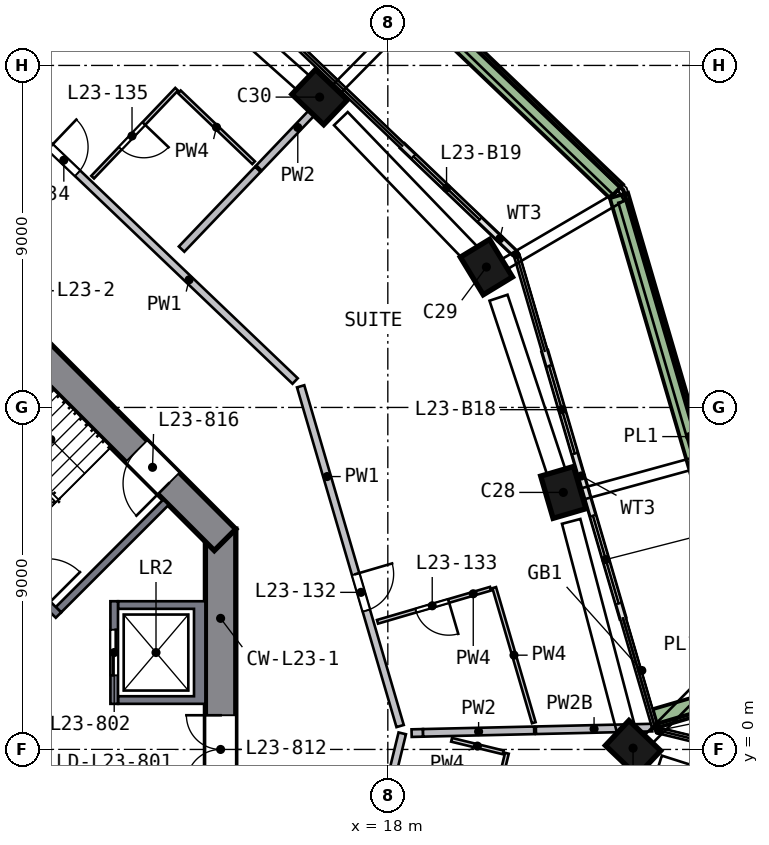
"""IFC4 building model, lengths in metres.
Left out: names, types, materials, properties, quantities, classifications, styles, units other than length and angle.
Written with IfcOpenShell. Run it as: python <this file> out.ifc"""

import sys

from ifc_helpers import new_model, si_unit, direction, frame, frame_2d, origin, origin_2d, place, context, subcontext, project, spatial, polyline, rectangle, outline, extrude, element, fill, save


model = new_model("IFC4")
c1 = context("Model", 3, precision=1e-05, world=origin(), true_north=direction((0.0, 1.0)))
c2 = subcontext(c1, "Body", "Model", "MODEL_VIEW")
j1 = project(units=[si_unit("LENGTHUNIT", "METRE"), si_unit("PLANEANGLEUNIT", "RADIAN")], contexts=[c1])
p1 = place(None, origin())
s1 = spatial("IfcSite", under=j1, at=p1, CompositionType="ELEMENT")
p2 = place(p1, origin())
s2 = spatial("IfcBuilding", under=s1, at=p2, CompositionType="ELEMENT")
p3 = place(p2, frame((0.0, 0.0, 100.0)))
s3 = spatial("IfcBuildingStorey", under=s2, at=p3, CompositionType="ELEMENT", Elevation=100.0)
p4 = place(p3, frame((24.454, -0.106, 0.0), z_axis=(-0.000532111, 0.116228153, 0.993222399), x_axis=(0.725905426, -0.683088025, 0.08032473)))
e1 = element("IfcColumn", 1, at=p4, inside=s3, PredefinedType="COLUMN", context=c2, shape_type="SweptSolid", body=[
    extrude(rectangle(XDim=1.15, YDim=0.9, at=origin_2d()), origin(), (0.0, 0.0, 1.0), 3.212),
])
p5 = place(p3, frame((22.657, 6.634, 0.0), z_axis=(-0.032397695, 0.10745996, 0.993681411), x_axis=(-0.278746305, 0.953784116, -0.112233498)))
e2 = element("IfcColumn", 2, at=p5, inside=s3, PredefinedType="COLUMN", context=c2, shape_type="SweptSolid", body=[
    extrude(rectangle(XDim=1.15, YDim=0.9, at=origin_2d()), origin(), (0.0, 0.0, 1.0), 3.21),
])
p6 = place(p3, frame((20.667, 12.576, 0.0), z_axis=(-0.060592698, 0.097845423, 0.993355323), x_axis=(0.515804242, -0.848941532, 0.115083708)))
e3 = element("IfcColumn", 3, at=p6, inside=s3, PredefinedType="COLUMN", context=c2, shape_type="SweptSolid", body=[
    extrude(rectangle(XDim=1.15, YDim=0.9, at=origin_2d()), origin(), (0.0, 0.0, 1.0), 3.211),
])
p7 = place(p3, frame((16.305, 17.074, 0.0), z_axis=(-0.0819059, 0.076886597, 0.993669902), x_axis=(-0.718682033, 0.686204712, -0.112335337)))
e4 = element("IfcColumn", 4, at=p7, inside=s3, PredefinedType="COLUMN", context=c2, shape_type="SweptSolid", body=[
    extrude(rectangle(XDim=1.15, YDim=0.9, at=origin_2d()), origin(), (0.0, 0.0, 1.0), 3.21),
])
p8 = place(p3, frame((13.6, -5.799, 0.0), z_axis=(0.0, 0.0, 1.0), x_axis=(0.0, 1.0, 0.0)))
e5 = element("IfcWall", 5, at=p8, inside=s3, PredefinedType="SHEAR", context=c2, shape_type="SweptSolid", body=[
    extrude(rectangle(XDim=11.598, YDim=0.8, at=frame_2d((5.799, 0.0))), origin(), (0.0, 0.0, 1.0), 3.5),
])
p9 = place(p8, frame((4.899, 0.0, 0.0)))
e6 = element("IfcOpeningElement", 6, at=p9, cuts=e5, PredefinedType="OPENING", context=c2, shape_type="SweptSolid", body=[
    extrude(rectangle(XDim=1.8, YDim=2.1, at=frame_2d((0.9, 1.05))), frame((0.0, 0.41, 0.0), z_axis=(0.0, -1.0, 0.0), x_axis=(1.0, 0.0, 0.0)), (0.0, 0.0, 1.0), 0.82),
])
p10 = place(p3, frame((13.717, 5.516, 0.0), z_axis=(0.0, 0.0, 1.0), x_axis=(-0.707106781, 0.707106781, 0.0)))
e7 = element("IfcWall", 7, at=p10, inside=s3, PredefinedType="SHEAR", context=c2, shape_type="SweptSolid", body=[
    extrude(rectangle(XDim=11.598, YDim=0.8, at=frame_2d((5.799, 0.0))), origin(), (0.0, 0.0, 1.0), 3.5),
])
p11 = place(p10, frame((2.099, 0.0, 0.0)))
e8 = element("IfcOpeningElement", 8, at=p11, cuts=e7, PredefinedType="OPENING", context=c2, shape_type="SweptSolid", body=[
    extrude(rectangle(XDim=1.2, YDim=2.1, at=frame_2d((0.6, 1.05))), frame((0.0, 0.41, 0.0), z_axis=(0.0, -1.0, 0.0), x_axis=(1.0, 0.0, 0.0)), (0.0, 0.0, 1.0), 0.82),
])
p12 = place(p3, frame((24.185, 3.461, 0.0), z_axis=(0.0, 0.0, 1.0), x_axis=(-0.28096031, 0.959719388, 0.0)))
e9 = element("IfcWall", 9, at=p12, inside=s3, PredefinedType="SOLIDWALL", context=c2, shape_type="SweptSolid", body=[
    extrude(rectangle(XDim=3.475, YDim=0.15, at=frame_2d((1.737, 0.0))), origin(), (0.0, 0.0, 1.0), 2.425),
])
p13 = place(p12, frame((0.4, 0.0, 0.0)))
e10 = element("IfcOpeningElement", 10, at=p13, cuts=e9, PredefinedType="OPENING", context=c2, shape_type="SweptSolid", body=[
    extrude(rectangle(XDim=2.4, YDim=2.4, at=frame_2d((1.2, 1.2))), frame((0.0, 0.085, 0.0), z_axis=(0.0, -1.0, 0.0), x_axis=(1.0, 0.0, 0.0)), (0.0, 0.0, 1.0), 0.17),
])
p14 = place(p3, frame((23.209, 6.796, 0.0), z_axis=(0.0, 0.0, 1.0), x_axis=(-0.281028882, 0.959699311, 0.0)))
e11 = element("IfcWall", 11, at=p14, inside=s3, PredefinedType="SOLIDWALL", context=c2, shape_type="SweptSolid", body=[
    extrude(rectangle(XDim=3.835, YDim=0.15, at=frame_2d((1.918, 0.0))), origin(), (0.0, 0.0, 1.0), 2.425),
])
p15 = place(p14, frame((1.035, 0.0, 0.0)))
e12 = element("IfcOpeningElement", 12, at=p15, cuts=e11, PredefinedType="OPENING", context=c2, shape_type="SweptSolid", body=[
    extrude(rectangle(XDim=2.4, YDim=2.4, at=frame_2d((1.2, 1.2))), frame((0.0, 0.085, 0.0), z_axis=(0.0, -1.0, 0.0), x_axis=(1.0, 0.0, 0.0)), (0.0, 0.0, 1.0), 0.17),
])
p16 = place(p3, frame((21.33, 13.07, 0.0), z_axis=(0.0, 0.0, 1.0), x_axis=(-0.723183846, 0.690655576, 0.0)))
e13 = element("IfcWall", 13, at=p16, inside=s3, PredefinedType="SOLIDWALL", context=c2, shape_type="SweptSolid", body=[
    extrude(rectangle(XDim=4.068, YDim=0.15, at=frame_2d((2.034, 0.0))), origin(), (0.0, 0.0, 1.0), 2.425),
])
p17 = place(p16, frame((1.268, 0.0, 0.0)))
e14 = element("IfcOpeningElement", 14, at=p17, cuts=e13, PredefinedType="OPENING", context=c2, shape_type="SweptSolid", body=[
    extrude(rectangle(XDim=2.4, YDim=2.4, at=frame_2d((1.2, 1.2))), frame((0.0, 0.085, 0.0), z_axis=(0.0, -1.0, 0.0), x_axis=(1.0, 0.0, 0.0)), (0.0, 0.0, 1.0), 0.17),
])
p18 = place(p3, frame((25.038, 0.819, 0.0), z_axis=(0.0, 0.0, 1.0), x_axis=(0.959706288, 0.281005054, 0.0)))
e15 = element("IfcWall", 15, at=p18, inside=s3, PredefinedType="SOLIDWALL", context=c2, shape_type="SweptSolid", body=[
    extrude(rectangle(XDim=3.199, YDim=0.5, at=frame_2d((1.6, 0.0))), origin(), (0.0, 0.0, 1.0), 0.7),
])
p19 = place(p3, frame((27.798, 1.887, 0.0), z_axis=(0.0, 0.0, 1.0), x_axis=(-0.281006596, 0.959705837, 0.0)))
e16 = element("IfcWall", 16, at=p19, inside=s3, PredefinedType="SOLIDWALL", context=c2, shape_type="SweptSolid", body=[
    extrude(rectangle(XDim=13.223, YDim=0.5, at=frame_2d((6.612, 0.0))), origin(), (0.0, 0.0, 1.0), 0.7),
])
p20 = place(p3, frame((24.015, 14.688, 0.0), z_axis=(0.0, 0.0, 1.0), x_axis=(-0.723197204, 0.690641589, 0.0)))
e17 = element("IfcWall", 17, at=p20, inside=s3, PredefinedType="SOLIDWALL", context=c2, shape_type="SweptSolid", body=[
    extrude(rectangle(XDim=13.724, YDim=0.5, at=frame_2d((6.862, 0.0))), origin(), (0.0, 0.0, 1.0), 0.7),
])
p21 = place(p3, frame((27.412, -0.137, 0.0), z_axis=(0.0, 0.0, 1.0), x_axis=(-0.236506093, -0.971630006, 0.0)))
e18 = element("IfcWall", 18, at=p21, inside=s3, PredefinedType="SOLIDWALL", context=c2, shape_type="SweptSolid", body=[
    extrude(rectangle(XDim=12.7, YDim=0.2, at=frame_2d((6.35, 0.0))), origin(), (0.0, 0.0, 1.0), 3.19),
])
p22 = place(p21, frame((5.45, 0.0, 0.0)))
e19 = element("IfcOpeningElement", 19, at=p22, cuts=e18, PredefinedType="OPENING", context=c2, shape_type="SweptSolid", body=[
    extrude(rectangle(XDim=1.8, YDim=2.4, at=frame_2d((0.9, 1.2))), frame((0.0, 0.11, 0.0), z_axis=(0.0, -1.0, 0.0), x_axis=(1.0, 0.0, 0.0)), (0.0, 0.0, 1.0), 0.22),
])
p23 = place(p3, origin())
e20 = element("IfcWall", 20, at=p23, inside=s3, PredefinedType="SOLIDWALL", context=c2, shape_type="SweptSolid", body=[
    extrude(outline(polyline([(13.2, 3.9), (13.2, 1.2), (10.9, 1.2), (10.9, 1.4), (12.9, 1.4), (12.9, 3.7), (10.9, 3.7), (10.9, 3.9), (13.2, 3.9)])), origin(), (0.0, 0.0, 1.0), 3.19),
])
p24 = place(p3, frame((10.8, 1.2, 0.0), z_axis=(0.0, 0.0, 1.0), x_axis=(0.0, 1.0, 0.0)))
e21 = element("IfcWall", 21, at=p24, inside=s3, PredefinedType="SOLIDWALL", context=c2, shape_type="SweptSolid", body=[
    extrude(rectangle(XDim=2.7, YDim=0.2, at=frame_2d((1.35, 0.0))), origin(), (0.0, 0.0, 1.0), 3.19),
])
p25 = place(p24, frame((0.75, 0.0, 0.0)))
e22 = element("IfcOpeningElement", 22, at=p25, cuts=e21, PredefinedType="OPENING", context=c2, shape_type="SweptSolid", body=[
    extrude(rectangle(XDim=1.2, YDim=2.1, at=frame_2d((0.6, 1.05))), frame((0.0, 0.11, 0.0), z_axis=(0.0, -1.0, 0.0), x_axis=(1.0, 0.0, 0.0)), (0.0, 0.0, 1.0), 0.22),
])
p26 = place(p3, frame((3.535, 9.334, 0.0), z_axis=(0.0, 0.0, 1.0), x_axis=(0.707106781, -0.707106781, 0.0)))
e23 = element("IfcWall", 23, at=p26, inside=s3, PredefinedType="SOLIDWALL", context=c2, shape_type="SweptSolid", body=[
    extrude(rectangle(XDim=8.2, YDim=0.2, at=frame_2d((4.1, 0.0))), origin(), (0.0, 0.0, 1.0), 3.19),
])
p27 = place(p26, frame((6.6, 0.0, 0.0)))
e24 = element("IfcOpeningElement", 24, at=p27, cuts=e23, PredefinedType="OPENING", context=c2, shape_type="SweptSolid", body=[
    extrude(rectangle(XDim=1.2, YDim=2.1, at=frame_2d((0.6, 1.05))), frame((0.0, 0.11, 0.0), z_axis=(0.0, -1.0, 0.0), x_axis=(1.0, 0.0, 0.0)), (0.0, 0.0, 1.0), 0.22),
])
p28 = place(p3, frame((9.334, 3.677, 0.0), z_axis=(0.0, 0.0, 1.0), x_axis=(0.707106781, 0.707106781, 0.0)))
e25 = element("IfcWall", 25, at=p28, inside=s3, PredefinedType="SOLIDWALL", context=c2, shape_type="SweptSolid", body=[
    extrude(rectangle(XDim=4.0, YDim=0.2, at=frame_2d((2.0, 0.0))), origin(), (0.0, 0.0, 1.0), 3.19),
])
p29 = place(p3, frame((8.968, 15.991, 0.0), z_axis=(0.0, 0.0, 1.0), x_axis=(0.723216288, -0.690621605, 0.0)))
e26 = element("IfcWall", 26, at=p29, inside=s3, PredefinedType="SOLIDWALL", context=c2, shape_type="SweptSolid", body=[
    extrude(rectangle(XDim=9.115, YDim=0.2, at=frame_2d((4.558, 0.0))), origin(), (0.0, 0.0, 1.0), 3.19),
])
p30 = place(p29, frame((0.2, 0.0, 0.0)))
e27 = element("IfcOpeningElement", 27, at=p30, cuts=e26, PredefinedType="OPENING", context=c2, shape_type="SweptSolid", body=[
    extrude(rectangle(XDim=1.0, YDim=2.1, at=frame_2d((0.5, 1.05))), frame((0.0, 0.11, 0.0), z_axis=(0.0, -1.0, 0.0), x_axis=(1.0, 0.0, 0.0)), (0.0, 0.0, 1.0), 0.22),
])
p31 = place(p3, frame((15.706, 9.556, 0.0), z_axis=(0.0, 0.0, 1.0), x_axis=(0.281011202, -0.959704488, 0.0)))
e28 = element("IfcWall", 28, at=p31, inside=s3, PredefinedType="SOLIDWALL", context=c2, shape_type="SweptSolid", body=[
    extrude(rectangle(XDim=9.316, YDim=0.2, at=frame_2d((4.658, 0.0))), origin(), (0.0, 0.0, 1.0), 3.19),
])
p32 = place(p31, frame((5.15, 0.0, 0.0)))
e29 = element("IfcOpeningElement", 29, at=p32, cuts=e28, PredefinedType="OPENING", context=c2, shape_type="SweptSolid", body=[
    extrude(rectangle(XDim=1.0, YDim=2.1, at=frame_2d((0.5, 1.05))), frame((0.0, 0.11, 0.0), z_axis=(0.0, -1.0, 0.0), x_axis=(1.0, 0.0, 0.0)), (0.0, 0.0, 1.0), 0.22),
])
p33 = place(p3, frame((17.515, -3.131, 0.0), z_axis=(0.0, 0.0, 1.0), x_axis=(0.236501426, 0.971631142, 0.0)))
e30 = element("IfcWall", 30, at=p33, inside=s3, PredefinedType="SOLIDWALL", context=c2, shape_type="SweptSolid", body=[
    extrude(rectangle(XDim=3.658, YDim=0.2, at=frame_2d((1.829, 0.0))), origin(), (0.0, 0.0, 1.0), 3.19),
])
p34 = place(p3, frame((12.573, 13.167, 0.0), z_axis=(0.0, 0.0, 1.0), x_axis=(0.690655642, 0.723183783, 0.0)))
e31 = element("IfcWall", 31, at=p34, inside=s3, PredefinedType="SOLIDWALL", context=c2, shape_type="SweptSolid", body=[
    extrude(rectangle(XDim=2.905, YDim=0.2, at=frame_2d((1.452, 0.0))), origin(), (0.0, 0.0, 1.0), 3.19),
])
p35 = place(p3, frame((14.611, 15.3, 0.0), z_axis=(0.0, 0.0, 1.0), x_axis=(0.690627184, 0.72321096, 0.0)))
e32 = element("IfcWall", 32, at=p35, inside=s3, PredefinedType="SOLIDWALL", context=c2, shape_type="SweptSolid", body=[
    extrude(rectangle(XDim=2.952, YDim=0.2, at=frame_2d((1.476, 0.0))), origin(), (0.0, 0.0, 1.0), 3.19),
])
p36 = place(p3, frame((18.626, 0.429, 0.0), z_axis=(0.0, 0.0, 1.0), x_axis=(0.999741836, 0.022721405, 0.0)))
e33 = element("IfcWall", 33, at=p36, inside=s3, PredefinedType="SOLIDWALL", context=c2, shape_type="SweptSolid", body=[
    extrude(rectangle(XDim=0.301, YDim=0.2, at=frame_2d((0.15, 0.0))), origin(), (0.0, 0.0, 1.0), 3.19),
])
p37 = place(p3, frame((18.927, 0.436, 0.0), z_axis=(0.0, 0.0, 1.0), x_axis=(0.999734545, 0.023039974, 0.0)))
e34 = element("IfcWall", 34, at=p37, inside=s3, PredefinedType="SOLIDWALL", context=c2, shape_type="SweptSolid", body=[
    extrude(rectangle(XDim=2.925, YDim=0.2, at=frame_2d((1.462, 0.0))), origin(), (0.0, 0.0, 1.0), 3.19),
])
p38 = place(p3, frame((21.897, 0.505, 0.0), z_axis=(0.0, 0.0, 1.0), x_axis=(0.999734414, 0.023045645, 0.0)))
e35 = element("IfcWall", 35, at=p38, inside=s3, PredefinedType="SOLIDWALL", context=c2, shape_type="SweptSolid", body=[
    extrude(rectangle(XDim=3.062, YDim=0.2, at=frame_2d((1.531, 0.0))), origin(), (0.0, 0.0, 1.0), 2.69),
])
p39 = place(p3, frame((12.443, 17.374, 0.0), z_axis=(0.0, 0.0, 1.0), x_axis=(-0.690669874, -0.723170191, 0.0)))
e36 = element("IfcWall", 36, at=p39, inside=s3, PredefinedType="PARTITIONING", context=c2, shape_type="SweptSolid", body=[
    extrude(rectangle(XDim=3.2, YDim=0.1, at=frame_2d((1.6, 0.0))), origin(), (0.0, 0.0, 1.0), 3.19),
])
p40 = place(p39, frame((1.25, 0.0, 0.0)))
e37 = element("IfcOpeningElement", 37, at=p40, cuts=e36, PredefinedType="OPENING", context=c2, shape_type="SweptSolid", body=[
    extrude(rectangle(XDim=0.9, YDim=2.1, at=frame_2d((0.45, 1.05))), frame((0.0, 0.06, 0.0), z_axis=(0.0, -1.0, 0.0), x_axis=(1.0, 0.0, 0.0)), (0.0, 0.0, 1.0), 0.12),
])
p41 = place(p3, frame((12.515, 17.305, 0.0), z_axis=(0.0, 0.0, 1.0), x_axis=(0.723195404, -0.690643473, 0.0)))
e38 = element("IfcWall", 38, at=p41, inside=s3, PredefinedType="PARTITIONING", context=c2, shape_type="SweptSolid", body=[
    extrude(rectangle(XDim=2.7, YDim=0.1, at=frame_2d((1.35, 0.0))), origin(), (0.0, 0.0, 1.0), 3.19),
])
p42 = place(p3, frame((20.704, 4.23, 0.0), z_axis=(0.0, 0.0, 1.0), x_axis=(-0.959708403, -0.280997832, 0.0)))
e39 = element("IfcWall", 39, at=p42, inside=s3, PredefinedType="PARTITIONING", context=c2, shape_type="SweptSolid", body=[
    extrude(rectangle(XDim=3.1, YDim=0.1, at=frame_2d((1.55, 0.0))), origin(), (0.0, 0.0, 1.0), 3.19),
])
p43 = place(p42, frame((1.15, 0.0, 0.0)))
e40 = element("IfcOpeningElement", 40, at=p43, cuts=e39, PredefinedType="OPENING", context=c2, shape_type="SweptSolid", body=[
    extrude(rectangle(XDim=0.9, YDim=2.1, at=frame_2d((0.45, 1.05))), frame((0.0, 0.06, 0.0), z_axis=(0.0, -1.0, 0.0), x_axis=(1.0, 0.0, 0.0)), (0.0, 0.0, 1.0), 0.12),
])
p44 = place(p3, frame((19.678, 0.253, 0.0), z_axis=(0.0, 0.0, 1.0), x_axis=(0.971623162, -0.236534205, 0.0)))
e41 = element("IfcWall", 41, at=p44, inside=s3, PredefinedType="PARTITIONING", context=c2, shape_type="SweptSolid", body=[
    extrude(rectangle(XDim=1.399, YDim=0.1, at=frame_2d((0.699, 0.0))), origin(), (0.0, 0.0, 1.0), 3.19),
])
p45 = place(p3, frame((20.283, -3.599, 0.0), z_axis=(0.0, 0.0, 1.0), x_axis=(0.236483098, 0.971635603, 0.0)))
e42 = element("IfcWall", 42, at=p45, inside=s3, PredefinedType="PARTITIONING", context=c2, shape_type="SweptSolid", body=[
    extrude(rectangle(XDim=3.6, YDim=0.1, at=frame_2d((1.8, 0.0))), origin(), (0.0, 0.0, 1.0), 3.19),
])
p46 = place(p45, frame((1.2, 0.0, 0.0)))
e43 = element("IfcOpeningElement", 43, at=p46, cuts=e42, PredefinedType="OPENING", context=c2, shape_type="SweptSolid", body=[
    extrude(rectangle(XDim=1.0, YDim=2.1, at=frame_2d((0.5, 1.05))), frame((0.0, 0.06, 0.0), z_axis=(0.0, -1.0, 0.0), x_axis=(1.0, 0.0, 0.0)), (0.0, 0.0, 1.0), 0.12),
])
p47 = place(p3, frame((20.8, 4.258, 0.0), z_axis=(0.0, 0.0, 1.0), x_axis=(0.281052751, -0.959692321, 0.0)))
e44 = element("IfcWall", 44, at=p47, inside=s3, PredefinedType="PARTITIONING", context=c2, shape_type="SweptSolid", body=[
    extrude(rectangle(XDim=3.704, YDim=0.1, at=frame_2d((1.852, 0.0))), origin(), (0.0, 0.0, 1.0), 3.19),
])
p48 = place(p13, origin())
e45 = element("IfcDoor", 45, at=p48, inside=s3, OperationType="SLIDING_TO_RIGHT", PredefinedType="DOOR", context=c2, shape_type="SweptSolid", body=[
    extrude(rectangle(XDim=2.4, YDim=2.4, at=frame_2d((1.2, 1.2))), frame((0.0, 0.025, 0.0), z_axis=(0.0, -1.0, 0.0), x_axis=(1.0, 0.0, 0.0)), (0.0, 0.0, 1.0), 0.05),
])
fill(e10, e45)
p49 = place(p15, origin())
e46 = element("IfcDoor", 46, at=p49, inside=s3, OperationType="SLIDING_TO_LEFT", PredefinedType="DOOR", context=c2, shape_type="SweptSolid", body=[
    extrude(rectangle(XDim=2.4, YDim=2.4, at=frame_2d((1.2, 1.2))), frame((0.0, 0.025, 0.0), z_axis=(0.0, -1.0, 0.0), x_axis=(1.0, 0.0, 0.0)), (0.0, 0.0, 1.0), 0.05),
])
fill(e12, e46)
p50 = place(p17, origin())
e47 = element("IfcDoor", 47, at=p50, inside=s3, OperationType="SLIDING_TO_LEFT", PredefinedType="DOOR", context=c2, shape_type="SweptSolid", body=[
    extrude(rectangle(XDim=2.4, YDim=2.4, at=frame_2d((1.2, 1.2))), frame((0.0, 0.025, 0.0), z_axis=(0.0, -1.0, 0.0), x_axis=(1.0, 0.0, 0.0)), (0.0, 0.0, 1.0), 0.05),
])
fill(e14, e47)
p51 = place(p25, origin())
e48 = element("IfcDoor", 48, at=p51, inside=s3, OperationType="DOUBLE_DOOR_SLIDING", PredefinedType="DOOR", context=c2, shape_type="SweptSolid", body=[
    extrude(rectangle(XDim=1.2, YDim=2.1, at=frame_2d((0.6, 1.05))), frame((0.0, 0.025, 0.0), z_axis=(0.0, -1.0, 0.0), x_axis=(1.0, 0.0, 0.0)), (0.0, 0.0, 1.0), 0.05),
])
fill(e22, e48)
p52 = place(p9, origin())
e49 = element("IfcDoor", 49, at=p52, inside=s3, OperationType="DOUBLE_DOOR_SINGLE_SWING", PredefinedType="DOOR", context=c2, shape_type="SweptSolid", body=[
    extrude(rectangle(XDim=1.8, YDim=2.1, at=frame_2d((0.9, 1.05))), frame((0.0, 0.025, 0.0), z_axis=(0.0, -1.0, 0.0), x_axis=(1.0, 0.0, 0.0)), (0.0, 0.0, 1.0), 0.05),
])
fill(e6, e49)
p53 = place(p11, origin())
e50 = element("IfcDoor", 50, at=p53, inside=s3, OperationType="SINGLE_SWING_LEFT", PredefinedType="DOOR", context=c2, shape_type="SweptSolid", body=[
    extrude(rectangle(XDim=1.2, YDim=2.1, at=frame_2d((0.6, 1.05))), frame((0.0, 0.025, 0.0), z_axis=(0.0, -1.0, 0.0), x_axis=(1.0, 0.0, 0.0)), (0.0, 0.0, 1.0), 0.05),
])
fill(e8, e50)
p54 = place(p32, origin())
e51 = element("IfcDoor", 51, at=p54, inside=s3, OperationType="SINGLE_SWING_LEFT", PredefinedType="DOOR", context=c2, shape_type="SweptSolid", body=[
    extrude(rectangle(XDim=1.0, YDim=2.1, at=frame_2d((0.5, 1.05))), frame((0.0, 0.025, 0.0), z_axis=(0.0, -1.0, 0.0), x_axis=(1.0, 0.0, 0.0)), (0.0, 0.0, 1.0), 0.05),
])
fill(e29, e51)
p55 = place(p43, origin())
e52 = element("IfcDoor", 52, at=p55, inside=s3, OperationType="SINGLE_SWING_LEFT", PredefinedType="DOOR", context=c2, shape_type="SweptSolid", body=[
    extrude(rectangle(XDim=0.9, YDim=2.1, at=frame_2d((0.45, 1.05))), frame((0.0, 0.025, 0.0), z_axis=(0.0, -1.0, 0.0), x_axis=(1.0, 0.0, 0.0)), (0.0, 0.0, 1.0), 0.05),
])
fill(e40, e52)
p56 = place(p30, origin())
e53 = element("IfcDoor", 53, at=p56, inside=s3, OperationType="SINGLE_SWING_LEFT", PredefinedType="DOOR", context=c2, shape_type="SweptSolid", body=[
    extrude(rectangle(XDim=1.0, YDim=2.1, at=frame_2d((0.5, 1.05))), frame((0.0, 0.025, 0.0), z_axis=(0.0, -1.0, 0.0), x_axis=(1.0, 0.0, 0.0)), (0.0, 0.0, 1.0), 0.05),
])
fill(e27, e53)
p57 = place(p40, origin())
e54 = element("IfcDoor", 54, at=p57, inside=s3, OperationType="SINGLE_SWING_LEFT", PredefinedType="DOOR", context=c2, shape_type="SweptSolid", body=[
    extrude(rectangle(XDim=0.9, YDim=2.1, at=frame_2d((0.45, 1.05))), frame((0.0, 0.025, 0.0), z_axis=(0.0, -1.0, 0.0), x_axis=(1.0, 0.0, 0.0)), (0.0, 0.0, 1.0), 0.05),
])
fill(e37, e54)
save(model, sys.argv[1])
